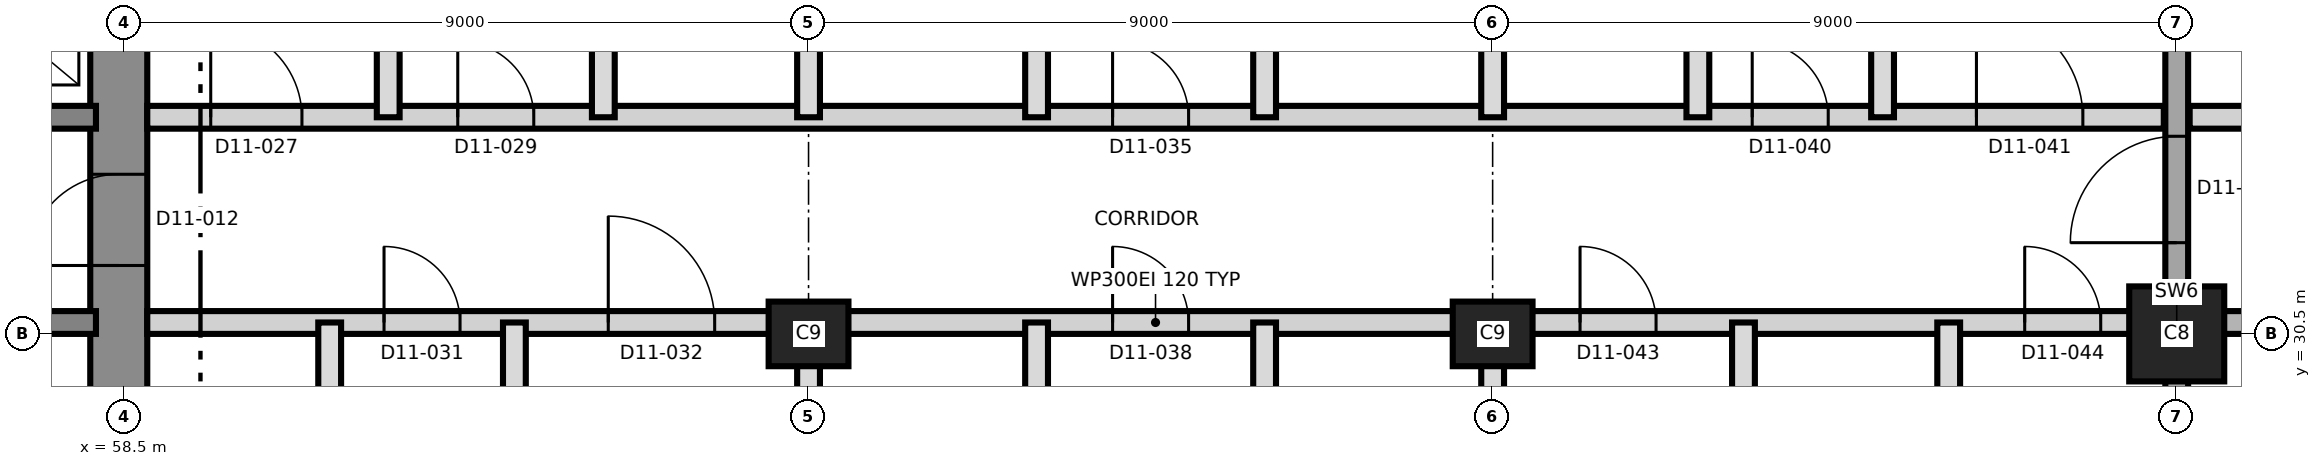
"""IFC4 building model, lengths in metres.
Left out: names, types, materials, properties, quantities, classifications, styles, units other than length and angle.
Written with IfcOpenShell. Run it as: python <this file> out.ifc"""

import sys

from ifc_helpers import new_model, si_unit, direction, frame, frame_2d, origin, origin_2d, place, context, subcontext, project, spatial, rectangle, extrude, element, fill, save


model = new_model("IFC4")
c1 = context("Model", 3, precision=1e-05, world=origin(), true_north=direction((0.0, 1.0)))
c2 = subcontext(c1, "Body", "Model", "MODEL_VIEW")
j1 = project(units=[si_unit("LENGTHUNIT", "METRE"), si_unit("PLANEANGLEUNIT", "RADIAN")], contexts=[c1])
p1 = place(None, origin())
s1 = spatial("IfcSite", under=j1, at=p1, CompositionType="ELEMENT")
p2 = place(p1, origin())
s2 = spatial("IfcBuilding", under=s1, at=p2, CompositionType="ELEMENT")
p3 = place(p2, frame((0.0, 0.0, 127.8)))
s3 = spatial("IfcBuildingStorey", under=s2, at=p3, CompositionType="ELEMENT", Elevation=127.8)
p4 = place(p3, frame((58.425, 21.125, 0.0), z_axis=(0.0, 0.0, 1.0), x_axis=(0.0, 1.0, 0.0)))
e1 = element("IfcWall", 1, at=p4, inside=s3, PredefinedType="SHEAR", context=c2, shape_type="SweptSolid", body=[
    extrude(rectangle(XDim=18.75, YDim=0.75, at=frame_2d((9.375, 0.0))), origin(), (0.0, 0.0, 1.0), 3.7),
])
p5 = place(p4, frame((10.275, 0.0, 0.0)))
e2 = element("IfcOpeningElement", 2, at=p5, cuts=e1, PredefinedType="OPENING", context=c2, shape_type="SweptSolid", body=[
    extrude(rectangle(XDim=1.2, YDim=2.1, at=frame_2d((0.6, 1.05))), frame((0.0, 0.385, 0.0), z_axis=(0.0, -1.0, 0.0), x_axis=(1.0, 0.0, 0.0)), (0.0, 0.0, 1.0), 0.77),
])
p6 = place(p3, frame((31.875, 30.65, 0.0), z_axis=(0.0, 0.0, 1.0), x_axis=(1.0, 0.0, 0.0)))
e3 = element("IfcWall", 3, at=p6, inside=s3, PredefinedType="SHEAR", context=c2, shape_type="SweptSolid", body=[
    extrude(rectangle(XDim=26.25, YDim=0.3, at=frame_2d((13.125, 0.0))), origin(), (0.0, 0.0, 1.0), 3.7),
])
p7 = place(p6, frame((24.625, 0.0, 0.0)))
e4 = element("IfcOpeningElement", 4, at=p7, cuts=e3, PredefinedType="OPENING", context=c2, shape_type="SweptSolid", body=[
    extrude(rectangle(XDim=1.0, YDim=2.1, at=frame_2d((0.5, 1.05))), frame((0.0, 0.16, 0.0), z_axis=(0.0, -1.0, 0.0), x_axis=(1.0, 0.0, 0.0)), (0.0, 0.0, 1.0), 0.32),
])
p8 = place(p6, frame((11.425, 0.0, 0.0)))
e5 = element("IfcOpeningElement", 5, at=p8, cuts=e3, PredefinedType="OPENING", context=c2, shape_type="SweptSolid", body=[
    extrude(rectangle(XDim=1.0, YDim=2.1, at=frame_2d((0.5, 1.05))), frame((0.0, 0.16, 0.0), z_axis=(0.0, -1.0, 0.0), x_axis=(1.0, 0.0, 0.0)), (0.0, 0.0, 1.0), 0.32),
])
p9 = place(p3, frame((31.875, 33.35, 0.0), z_axis=(0.0, 0.0, 1.0), x_axis=(1.0, 0.0, 0.0)))
e6 = element("IfcWall", 6, at=p9, inside=s3, PredefinedType="SHEAR", context=c2, shape_type="SweptSolid", body=[
    extrude(rectangle(XDim=26.25, YDim=0.3, at=frame_2d((13.125, 0.0))), origin(), (0.0, 0.0, 1.0), 3.7),
])
p10 = place(p9, frame((13.2, 0.0, 0.0)))
e7 = element("IfcOpeningElement", 7, at=p10, cuts=e6, PredefinedType="OPENING", context=c2, shape_type="SweptSolid", body=[
    extrude(rectangle(XDim=1.4, YDim=2.1, at=frame_2d((0.7, 1.05))), frame((0.0, 0.16, 0.0), z_axis=(0.0, -1.0, 0.0), x_axis=(1.0, 0.0, 0.0)), (0.0, 0.0, 1.0), 0.32),
])
p11 = place(p9, frame((5.25, 0.0, 0.0)))
e8 = element("IfcOpeningElement", 8, at=p11, cuts=e6, PredefinedType="OPENING", context=c2, shape_type="SweptSolid", body=[
    extrude(rectangle(XDim=1.2, YDim=2.1, at=frame_2d((0.6, 1.05))), frame((0.0, 0.16, 0.0), z_axis=(0.0, -1.0, 0.0), x_axis=(1.0, 0.0, 0.0)), (0.0, 0.0, 1.0), 0.32),
])
p12 = place(p9, frame((19.8, 0.0, 0.0)))
e9 = element("IfcOpeningElement", 9, at=p12, cuts=e6, PredefinedType="OPENING", context=c2, shape_type="SweptSolid", body=[
    extrude(rectangle(XDim=1.2, YDim=2.1, at=frame_2d((0.6, 1.05))), frame((0.0, 0.16, 0.0), z_axis=(0.0, -1.0, 0.0), x_axis=(1.0, 0.0, 0.0)), (0.0, 0.0, 1.0), 0.32),
])
for number, where, z_axis, x_axis in (
    (10, (67.5, 30.5, 0.0), (0.0, 0.0, 1.0), (1.0, 0.0, 0.0)),
    (11, (76.5, 30.5, 0.0), (0.0, 0.0, 1.0), (1.0, 0.0, 0.0)),
):
    element("IfcColumn", number, at=place(p3, frame(where, z_axis=z_axis, x_axis=x_axis)), inside=s3, PredefinedType="COLUMN", context=c2, shape_type="SweptSolid", body=[
        extrude(rectangle(XDim=1.05, YDim=0.85, at=origin_2d()), origin(), (0.0, 0.0, 1.0), 3.7),
    ])
p13 = place(p3, frame((85.5, 30.5, 0.0), z_axis=(0.0, 0.0, 1.0), x_axis=(1.0, 0.0, 0.0)))
e12 = element("IfcColumn", 12, at=p13, inside=s3, PredefinedType="COLUMN", context=c2, shape_type="SweptSolid", body=[
    extrude(rectangle(XDim=1.25, YDim=1.25, at=origin_2d()), origin(), (0.0, 0.0, 1.0), 3.7),
])
p14 = place(p3, frame((85.5, 20.135, 0.0), z_axis=(0.0, 0.0, 1.0), x_axis=(0.0, 1.0, 0.0)))
e13 = element("IfcWall", 13, at=p14, inside=s3, PredefinedType="SHEAR", context=c2, shape_type="SweptSolid", body=[
    extrude(rectangle(XDim=20.73, YDim=0.3, at=frame_2d((10.365, 0.0))), origin(), (0.0, 0.0, 1.0), 3.7),
])
p15 = place(p14, frame((11.565, 0.0, 0.0)))
e14 = element("IfcOpeningElement", 14, at=p15, cuts=e13, PredefinedType="OPENING", context=c2, shape_type="SweptSolid", body=[
    extrude(rectangle(XDim=1.4, YDim=2.1, at=frame_2d((0.7, 1.05))), frame((0.0, 0.16, 0.0), z_axis=(0.0, -1.0, 0.0), x_axis=(1.0, 0.0, 0.0)), (0.0, 0.0, 1.0), 0.32),
])
p16 = place(p3, frame((58.8, 30.65, 0.0), z_axis=(0.0, 0.0, 1.0), x_axis=(1.0, 0.0, 0.0)))
e15 = element("IfcWall", 15, at=p16, inside=s3, PredefinedType="PARTITIONING", context=c2, shape_type="SweptSolid", body=[
    extrude(rectangle(XDim=26.53, YDim=0.3, at=frame_2d((13.265, 0.0))), origin(), (0.0, 0.0, 1.0), 3.4),
])
p17 = place(p16, frame((3.115, 0.0, 0.0)))
e16 = element("IfcOpeningElement", 16, at=p17, cuts=e15, PredefinedType="OPENING", context=c2, shape_type="SweptSolid", body=[
    extrude(rectangle(XDim=1.0, YDim=2.1, at=frame_2d((0.5, 1.05))), frame((0.0, 0.16, 0.0), z_axis=(0.0, -1.0, 0.0), x_axis=(1.0, 0.0, 0.0)), (0.0, 0.0, 1.0), 0.32),
])
p18 = place(p16, frame((6.065, 0.0, 0.0)))
e17 = element("IfcOpeningElement", 17, at=p18, cuts=e15, PredefinedType="OPENING", context=c2, shape_type="SweptSolid", body=[
    extrude(rectangle(XDim=1.4, YDim=2.1, at=frame_2d((0.7, 1.05))), frame((0.0, 0.16, 0.0), z_axis=(0.0, -1.0, 0.0), x_axis=(1.0, 0.0, 0.0)), (0.0, 0.0, 1.0), 0.32),
])
p19 = place(p16, frame((12.7, 0.0, 0.0)))
e18 = element("IfcOpeningElement", 18, at=p19, cuts=e15, PredefinedType="OPENING", context=c2, shape_type="SweptSolid", body=[
    extrude(rectangle(XDim=1.0, YDim=2.4, at=frame_2d((0.5, 1.2))), frame((0.0, 0.16, 0.0), z_axis=(0.0, -1.0, 0.0), x_axis=(1.0, 0.0, 0.0)), (0.0, 0.0, 1.0), 0.32),
])
p20 = place(p16, frame((18.85, 0.0, 0.0)))
e19 = element("IfcOpeningElement", 19, at=p20, cuts=e15, PredefinedType="OPENING", context=c2, shape_type="SweptSolid", body=[
    extrude(rectangle(XDim=1.0, YDim=2.1, at=frame_2d((0.5, 1.05))), frame((0.0, 0.16, 0.0), z_axis=(0.0, -1.0, 0.0), x_axis=(1.0, 0.0, 0.0)), (0.0, 0.0, 1.0), 0.32),
])
p21 = place(p16, frame((24.7, 0.0, 0.0)))
e20 = element("IfcOpeningElement", 20, at=p21, cuts=e15, PredefinedType="OPENING", context=c2, shape_type="SweptSolid", body=[
    extrude(rectangle(XDim=1.0, YDim=2.1, at=frame_2d((0.5, 1.05))), frame((0.0, 0.16, 0.0), z_axis=(0.0, -1.0, 0.0), x_axis=(1.0, 0.0, 0.0)), (0.0, 0.0, 1.0), 0.32),
])
p22 = place(p3, frame((85.67, 30.65, 0.0), z_axis=(0.0, 0.0, 1.0), x_axis=(1.0, 0.0, 0.0)))
e21 = element("IfcWall", 21, at=p22, inside=s3, PredefinedType="SHEAR", context=c2, shape_type="SweptSolid", body=[
    extrude(rectangle(XDim=9.58, YDim=0.3, at=frame_2d((4.79, 0.0))), origin(), (0.0, 0.0, 1.0), 3.4),
])
p23 = place(p22, frame((2.08, 0.0, 0.0)))
e22 = element("IfcOpeningElement", 22, at=p23, cuts=e21, PredefinedType="OPENING", context=c2, shape_type="SweptSolid", body=[
    extrude(rectangle(XDim=1.2, YDim=2.1, at=frame_2d((0.6, 1.05))), frame((0.0, 0.16, 0.0), z_axis=(0.0, -1.0, 0.0), x_axis=(1.0, 0.0, 0.0)), (0.0, 0.0, 1.0), 0.32),
])
p24 = place(p22, frame((5.63, 0.0, 0.0)))
e23 = element("IfcOpeningElement", 23, at=p24, cuts=e21, PredefinedType="OPENING", context=c2, shape_type="SweptSolid", body=[
    extrude(rectangle(XDim=1.0, YDim=2.1, at=frame_2d((0.5, 1.05))), frame((0.0, 0.16, 0.0), z_axis=(0.0, -1.0, 0.0), x_axis=(1.0, 0.0, 0.0)), (0.0, 0.0, 1.0), 0.32),
])
p25 = place(p3, frame((58.8, 33.35, 0.0), z_axis=(0.0, 0.0, 1.0), x_axis=(1.0, 0.0, 0.0)))
e24 = element("IfcWall", 24, at=p25, inside=s3, PredefinedType="PARTITIONING", context=c2, shape_type="SweptSolid", body=[
    extrude(rectangle(XDim=26.53, YDim=0.3, at=frame_2d((13.265, 0.0))), origin(), (0.0, 0.0, 1.0), 3.4),
])
p26 = place(p25, frame((0.835, 0.0, 0.0)))
e25 = element("IfcOpeningElement", 25, at=p26, cuts=e24, PredefinedType="OPENING", context=c2, shape_type="SweptSolid", body=[
    extrude(rectangle(XDim=1.2, YDim=2.1, at=frame_2d((0.6, 1.05))), frame((0.0, 0.16, 0.0), z_axis=(0.0, -1.0, 0.0), x_axis=(1.0, 0.0, 0.0)), (0.0, 0.0, 1.0), 0.32),
])
p27 = place(p25, frame((4.085, 0.0, 0.0)))
e26 = element("IfcOpeningElement", 26, at=p27, cuts=e24, PredefinedType="OPENING", context=c2, shape_type="SweptSolid", body=[
    extrude(rectangle(XDim=1.0, YDim=2.1, at=frame_2d((0.5, 1.05))), frame((0.0, 0.16, 0.0), z_axis=(0.0, -1.0, 0.0), x_axis=(1.0, 0.0, 0.0)), (0.0, 0.0, 1.0), 0.32),
])
p28 = place(p25, frame((12.7, 0.0, 0.0)))
e27 = element("IfcOpeningElement", 27, at=p28, cuts=e24, PredefinedType="OPENING", context=c2, shape_type="SweptSolid", body=[
    extrude(rectangle(XDim=1.0, YDim=2.4, at=frame_2d((0.5, 1.2))), frame((0.0, 0.16, 0.0), z_axis=(0.0, -1.0, 0.0), x_axis=(1.0, 0.0, 0.0)), (0.0, 0.0, 1.0), 0.32),
])
p29 = place(p25, frame((21.115, 0.0, 0.0)))
e28 = element("IfcOpeningElement", 28, at=p29, cuts=e24, PredefinedType="OPENING", context=c2, shape_type="SweptSolid", body=[
    extrude(rectangle(XDim=1.0, YDim=2.1, at=frame_2d((0.5, 1.05))), frame((0.0, 0.16, 0.0), z_axis=(0.0, -1.0, 0.0), x_axis=(1.0, 0.0, 0.0)), (0.0, 0.0, 1.0), 0.32),
])
p30 = place(p25, frame((24.065, 0.0, 0.0)))
e29 = element("IfcOpeningElement", 29, at=p30, cuts=e24, PredefinedType="OPENING", context=c2, shape_type="SweptSolid", body=[
    extrude(rectangle(XDim=1.4, YDim=2.1, at=frame_2d((0.7, 1.05))), frame((0.0, 0.16, 0.0), z_axis=(0.0, -1.0, 0.0), x_axis=(1.0, 0.0, 0.0)), (0.0, 0.0, 1.0), 0.32),
])
p31 = place(p3, frame((85.67, 33.35, 0.0), z_axis=(0.0, 0.0, 1.0), x_axis=(1.0, 0.0, 0.0)))
e30 = element("IfcWall", 30, at=p31, inside=s3, PredefinedType="PARTITIONING", context=c2, shape_type="SweptSolid", body=[
    extrude(rectangle(XDim=9.58, YDim=0.3, at=frame_2d((4.79, 0.0))), origin(), (0.0, 0.0, 1.0), 3.4),
])
p32 = place(p31, frame((1.83, 0.0, 0.0)))
e31 = element("IfcOpeningElement", 31, at=p32, cuts=e30, PredefinedType="OPENING", context=c2, shape_type="SweptSolid", body=[
    extrude(rectangle(XDim=1.0, YDim=2.1, at=frame_2d((0.5, 1.05))), frame((0.0, 0.16, 0.0), z_axis=(0.0, -1.0, 0.0), x_axis=(1.0, 0.0, 0.0)), (0.0, 0.0, 1.0), 0.32),
])
p33 = place(p31, frame((5.63, 0.0, 0.0)))
e32 = element("IfcOpeningElement", 32, at=p33, cuts=e30, PredefinedType="OPENING", context=c2, shape_type="SweptSolid", body=[
    extrude(rectangle(XDim=1.0, YDim=2.1, at=frame_2d((0.5, 1.05))), frame((0.0, 0.16, 0.0), z_axis=(0.0, -1.0, 0.0), x_axis=(1.0, 0.0, 0.0)), (0.0, 0.0, 1.0), 0.32),
])
p34 = place(p3, frame((61.2, 27.45, 0.0), z_axis=(0.0, 0.0, 1.0), x_axis=(0.0, 1.0, 0.0)))
e33 = element("IfcWall", 33, at=p34, inside=s3, PredefinedType="PARTITIONING", context=c2, shape_type="SweptSolid", body=[
    extrude(rectangle(XDim=3.2, YDim=0.3, at=frame_2d((1.6, 0.0))), origin(), (0.0, 0.0, 1.0), 3.4),
])
p35 = place(p3, frame((61.97, 33.35, 0.0), z_axis=(0.0, 0.0, 1.0), x_axis=(0.0, 1.0, 0.0)))
e34 = element("IfcWall", 34, at=p35, inside=s3, PredefinedType="PARTITIONING", context=c2, shape_type="SweptSolid", body=[
    extrude(rectangle(XDim=7.695, YDim=0.3, at=frame_2d((3.847, 0.0))), origin(), (0.0, 0.0, 1.0), 3.4),
])
p36 = place(p3, frame((63.63, 20.135, 0.0), z_axis=(0.0, 0.0, 1.0), x_axis=(0.0, 1.0, 0.0)))
e35 = element("IfcWall", 35, at=p36, inside=s3, PredefinedType="PARTITIONING", context=c2, shape_type="SweptSolid", body=[
    extrude(rectangle(XDim=10.515, YDim=0.3, at=frame_2d((5.257, 0.0))), origin(), (0.0, 0.0, 1.0), 3.4),
])
p37 = place(p3, frame((64.8, 33.35, 0.0), z_axis=(0.0, 0.0, 1.0), x_axis=(0.0, 1.0, 0.0)))
e36 = element("IfcWall", 36, at=p37, inside=s3, PredefinedType="PARTITIONING", context=c2, shape_type="SweptSolid", body=[
    extrude(rectangle(XDim=3.2, YDim=0.3, at=frame_2d((1.6, 0.0))), origin(), (0.0, 0.0, 1.0), 3.4),
])
p38 = place(p3, frame((67.5, 20.135, 0.0), z_axis=(0.0, 0.0, 1.0), x_axis=(0.0, 1.0, 0.0)))
e37 = element("IfcWall", 37, at=p38, inside=s3, PredefinedType="PARTITIONING", context=c2, shape_type="SweptSolid", body=[
    extrude(rectangle(XDim=10.515, YDim=0.3, at=frame_2d((5.257, 0.0))), origin(), (0.0, 0.0, 1.0), 3.4),
])
p39 = place(p3, frame((67.5, 33.35, 0.0), z_axis=(0.0, 0.0, 1.0), x_axis=(0.0, 1.0, 0.0)))
e38 = element("IfcWall", 38, at=p39, inside=s3, PredefinedType="PARTITIONING", context=c2, shape_type="SweptSolid", body=[
    extrude(rectangle(XDim=7.695, YDim=0.3, at=frame_2d((3.847, 0.0))), origin(), (0.0, 0.0, 1.0), 3.4),
])
for number, where, z_axis, x_axis in (
    (39, (70.5, 27.35, 0.0), (0.0, 0.0, 1.0), (0.0, 1.0, 0.0)),
    (40, (70.5, 33.35, 0.0), (0.0, 0.0, 1.0), (0.0, 1.0, 0.0)),
    (41, (73.5, 27.35, 0.0), (0.0, 0.0, 1.0), (0.0, 1.0, 0.0)),
    (42, (73.5, 33.35, 0.0), (0.0, 0.0, 1.0), (0.0, 1.0, 0.0)),
):
    element("IfcWall", number, at=place(p3, frame(where, z_axis=z_axis, x_axis=x_axis)), inside=s3, PredefinedType="PARTITIONING", context=c2, shape_type="SweptSolid", body=[
        extrude(rectangle(XDim=3.3, YDim=0.3, at=frame_2d((1.65, 0.0))), origin(), (0.0, 0.0, 1.0), 3.4),
    ])
p40 = place(p3, frame((76.5, 20.135, 0.0), z_axis=(0.0, 0.0, 1.0), x_axis=(0.0, 1.0, 0.0)))
e43 = element("IfcWall", 43, at=p40, inside=s3, PredefinedType="PARTITIONING", context=c2, shape_type="SweptSolid", body=[
    extrude(rectangle(XDim=10.515, YDim=0.3, at=frame_2d((5.257, 0.0))), origin(), (0.0, 0.0, 1.0), 3.4),
])
p41 = place(p3, frame((76.5, 33.35, 0.0), z_axis=(0.0, 0.0, 1.0), x_axis=(0.0, 1.0, 0.0)))
e44 = element("IfcWall", 44, at=p41, inside=s3, PredefinedType="PARTITIONING", context=c2, shape_type="SweptSolid", body=[
    extrude(rectangle(XDim=7.695, YDim=0.3, at=frame_2d((3.847, 0.0))), origin(), (0.0, 0.0, 1.0), 3.4),
])
for number, where, z_axis, x_axis in (
    (45, (79.2, 33.35, 0.0), (0.0, 0.0, 1.0), (0.0, 1.0, 0.0)),
    (46, (79.8, 27.45, 0.0), (0.0, 0.0, 1.0), (0.0, 1.0, 0.0)),
):
    element("IfcWall", number, at=place(p3, frame(where, z_axis=z_axis, x_axis=x_axis)), inside=s3, PredefinedType="PARTITIONING", context=c2, shape_type="SweptSolid", body=[
        extrude(rectangle(XDim=3.2, YDim=0.3, at=frame_2d((1.6, 0.0))), origin(), (0.0, 0.0, 1.0), 3.4),
    ])
p42 = place(p3, frame((81.63, 33.35, 0.0), z_axis=(0.0, 0.0, 1.0), x_axis=(0.0, 1.0, 0.0)))
e47 = element("IfcWall", 47, at=p42, inside=s3, PredefinedType="PARTITIONING", context=c2, shape_type="SweptSolid", body=[
    extrude(rectangle(XDim=7.695, YDim=0.3, at=frame_2d((3.847, 0.0))), origin(), (0.0, 0.0, 1.0), 3.4),
])
p43 = place(p3, frame((82.5, 20.135, 0.0), z_axis=(0.0, 0.0, 1.0), x_axis=(0.0, 1.0, 0.0)))
e48 = element("IfcWall", 48, at=p43, inside=s3, PredefinedType="PARTITIONING", context=c2, shape_type="SweptSolid", body=[
    extrude(rectangle(XDim=10.515, YDim=0.3, at=frame_2d((5.257, 0.0))), origin(), (0.0, 0.0, 1.0), 3.4),
])
p44 = place(p5, origin())
e49 = element("IfcDoor", 49, at=p44, inside=s3, OperationType="SINGLE_SWING_LEFT", PredefinedType="DOOR", context=c2, shape_type="SweptSolid", body=[
    extrude(rectangle(XDim=1.2, YDim=2.1, at=frame_2d((0.6, 1.05))), frame((0.0, 0.025, 0.0), z_axis=(0.0, -1.0, 0.0), x_axis=(1.0, 0.0, 0.0)), (0.0, 0.0, 1.0), 0.05),
])
fill(e2, e49)
p45 = place(p26, origin())
e50 = element("IfcDoor", 50, at=p45, inside=s3, OperationType="SINGLE_SWING_LEFT", PredefinedType="DOOR", context=c2, shape_type="SweptSolid", body=[
    extrude(rectangle(XDim=1.2, YDim=2.1, at=frame_2d((0.6, 1.05))), frame((0.0, 0.025, 0.0), z_axis=(0.0, -1.0, 0.0), x_axis=(1.0, 0.0, 0.0)), (0.0, 0.0, 1.0), 0.05),
])
fill(e25, e50)
p46 = place(p27, origin())
e51 = element("IfcDoor", 51, at=p46, inside=s3, OperationType="SINGLE_SWING_LEFT", PredefinedType="DOOR", context=c2, shape_type="SweptSolid", body=[
    extrude(rectangle(XDim=1.0, YDim=2.1, at=frame_2d((0.5, 1.05))), frame((0.0, 0.025, 0.0), z_axis=(0.0, -1.0, 0.0), x_axis=(1.0, 0.0, 0.0)), (0.0, 0.0, 1.0), 0.05),
])
fill(e26, e51)
p47 = place(p17, origin())
e52 = element("IfcDoor", 52, at=p47, inside=s3, OperationType="SINGLE_SWING_LEFT", PredefinedType="DOOR", context=c2, shape_type="SweptSolid", body=[
    extrude(rectangle(XDim=1.0, YDim=2.1, at=frame_2d((0.5, 1.05))), frame((0.0, 0.025, 0.0), z_axis=(0.0, -1.0, 0.0), x_axis=(1.0, 0.0, 0.0)), (0.0, 0.0, 1.0), 0.05),
])
fill(e16, e52)
p48 = place(p18, origin())
e53 = element("IfcDoor", 53, at=p48, inside=s3, OperationType="SINGLE_SWING_RIGHT", PredefinedType="DOOR", context=c2, shape_type="SweptSolid", body=[
    extrude(rectangle(XDim=1.4, YDim=2.1, at=frame_2d((0.7, 1.05))), frame((0.0, 0.025, 0.0), z_axis=(0.0, -1.0, 0.0), x_axis=(1.0, 0.0, 0.0)), (0.0, 0.0, 1.0), 0.05),
])
fill(e17, e53)
p49 = place(p28, origin())
e54 = element("IfcDoor", 54, at=p49, inside=s3, OperationType="SINGLE_SWING_LEFT", PredefinedType="DOOR", context=c2, shape_type="SweptSolid", body=[
    extrude(rectangle(XDim=1.0, YDim=2.4, at=frame_2d((0.5, 1.2))), frame((0.0, 0.025, 0.0), z_axis=(0.0, -1.0, 0.0), x_axis=(1.0, 0.0, 0.0)), (0.0, 0.0, 1.0), 0.05),
])
fill(e27, e54)
p50 = place(p19, origin())
e55 = element("IfcDoor", 55, at=p50, inside=s3, OperationType="SINGLE_SWING_LEFT", PredefinedType="DOOR", context=c2, shape_type="SweptSolid", body=[
    extrude(rectangle(XDim=1.0, YDim=2.4, at=frame_2d((0.5, 1.2))), frame((0.0, 0.025, 0.0), z_axis=(0.0, -1.0, 0.0), x_axis=(1.0, 0.0, 0.0)), (0.0, 0.0, 1.0), 0.05),
])
fill(e18, e55)
p51 = place(p29, origin())
e56 = element("IfcDoor", 56, at=p51, inside=s3, OperationType="SINGLE_SWING_LEFT", PredefinedType="DOOR", context=c2, shape_type="SweptSolid", body=[
    extrude(rectangle(XDim=1.0, YDim=2.1, at=frame_2d((0.5, 1.05))), frame((0.0, 0.025, 0.0), z_axis=(0.0, -1.0, 0.0), x_axis=(1.0, 0.0, 0.0)), (0.0, 0.0, 1.0), 0.05),
])
fill(e28, e56)
p52 = place(p30, origin())
e57 = element("IfcDoor", 57, at=p52, inside=s3, OperationType="SINGLE_SWING_RIGHT", PredefinedType="DOOR", context=c2, shape_type="SweptSolid", body=[
    extrude(rectangle(XDim=1.4, YDim=2.1, at=frame_2d((0.7, 1.05))), frame((0.0, 0.025, 0.0), z_axis=(0.0, -1.0, 0.0), x_axis=(1.0, 0.0, 0.0)), (0.0, 0.0, 1.0), 0.05),
])
fill(e29, e57)
p53 = place(p20, origin())
e58 = element("IfcDoor", 58, at=p53, inside=s3, OperationType="SINGLE_SWING_LEFT", PredefinedType="DOOR", context=c2, shape_type="SweptSolid", body=[
    extrude(rectangle(XDim=1.0, YDim=2.1, at=frame_2d((0.5, 1.05))), frame((0.0, 0.025, 0.0), z_axis=(0.0, -1.0, 0.0), x_axis=(1.0, 0.0, 0.0)), (0.0, 0.0, 1.0), 0.05),
])
fill(e19, e58)
p54 = place(p21, origin())
e59 = element("IfcDoor", 59, at=p54, inside=s3, OperationType="SINGLE_SWING_RIGHT", PredefinedType="DOOR", context=c2, shape_type="SweptSolid", body=[
    extrude(rectangle(XDim=1.0, YDim=2.1, at=frame_2d((0.5, 1.05))), frame((0.0, 0.025, 0.0), z_axis=(0.0, -1.0, 0.0), x_axis=(1.0, 0.0, 0.0)), (0.0, 0.0, 1.0), 0.05),
])
fill(e20, e59)
p55 = place(p15, origin())
e60 = element("IfcDoor", 60, at=p55, inside=s3, OperationType="SINGLE_SWING_RIGHT", PredefinedType="DOOR", context=c2, shape_type="SweptSolid", body=[
    extrude(rectangle(XDim=1.4, YDim=2.1, at=frame_2d((0.7, 1.05))), frame((0.0, 0.025, 0.0), z_axis=(0.0, -1.0, 0.0), x_axis=(1.0, 0.0, 0.0)), (0.0, 0.0, 1.0), 0.05),
])
fill(e14, e60)
save(model, sys.argv[1])
